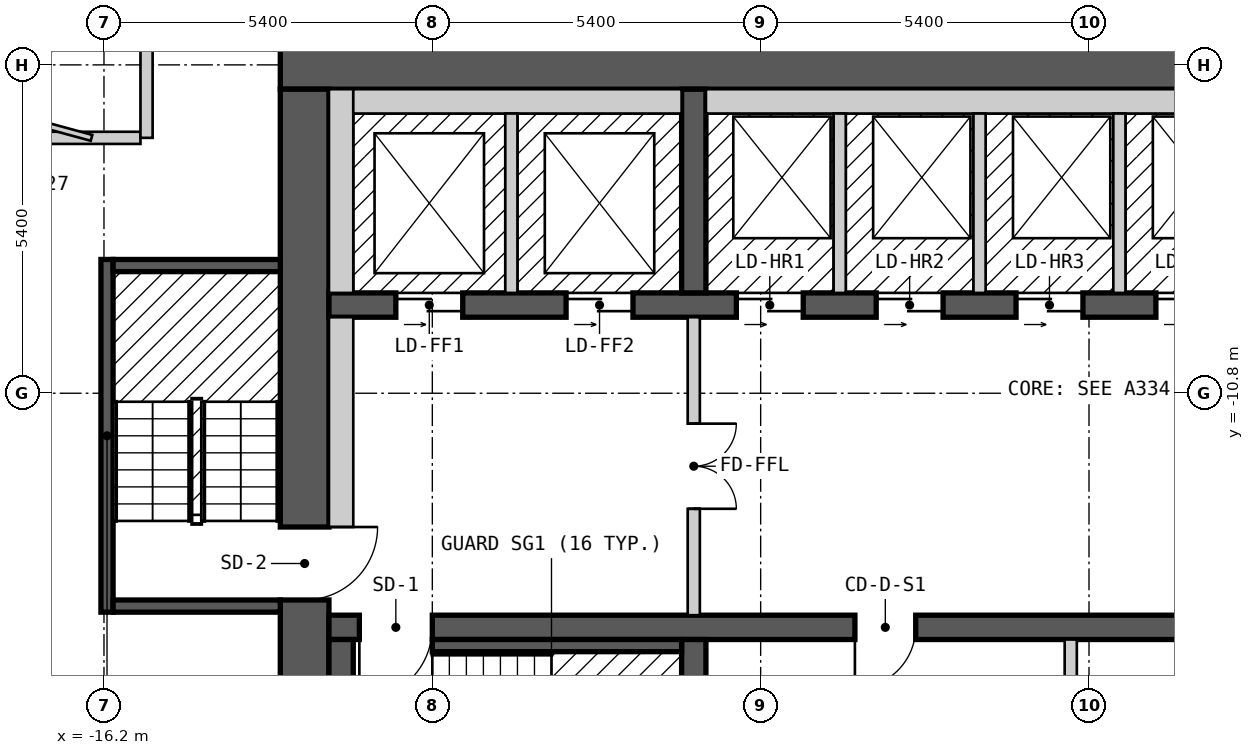
"""IFC4 building model, lengths in metres.
Left out: names, types, materials, properties, quantities, classifications, styles, units other than length and angle.
Written with IfcOpenShell. Run it as: python <this file> out.ifc"""

import sys

from ifc_helpers import new_model, si_unit, direction, frame, frame_2d, origin, place, context, subcontext, project, spatial, polyline, rectangle, outline, extrude, element, fill, save


model = new_model("IFC4")
c1 = context("Model", 3, precision=1e-05, world=origin(), true_north=direction((0.0, 1.0)))
c2 = subcontext(c1, "Body", "Model", "MODEL_VIEW")
j1 = project(units=[si_unit("LENGTHUNIT", "METRE"), si_unit("PLANEANGLEUNIT", "RADIAN")], contexts=[c1])
p1 = place(None, origin())
s1 = spatial("IfcSite", under=j1, at=p1, CompositionType="ELEMENT")
p2 = place(p1, origin())
s2 = spatial("IfcBuilding", under=s1, at=p2, CompositionType="ELEMENT")
p3 = place(p2, frame((0.0, 0.0, 120.6)))
s3 = spatial("IfcBuildingStorey", under=s2, at=p3, CompositionType="ELEMENT", Elevation=120.6)
p4 = place(p3, frame((-13.3, -5.4, 0.0), z_axis=(0.0, 0.0, 1.0), x_axis=(1.0, 0.0, 0.0)))
e1 = element("IfcWall", 1, at=p4, inside=s3, PredefinedType="SHEAR", context=c2, shape_type="SweptSolid", body=[
    extrude(rectangle(XDim=26.6, YDim=0.8, at=frame_2d((13.3, 0.0))), origin(), (0.0, 0.0, 1.0), 2.7),
])
p5 = place(p4, frame((23.65, 0.0, 0.0)))
e2 = element("IfcOpeningElement", 2, at=p5, cuts=e1, PredefinedType="OPENING", context=c2, shape_type="SweptSolid", body=[
    extrude(rectangle(XDim=1.2, YDim=2.1, at=frame_2d((0.6, 1.05))), frame((0.0, 0.41, 0.0), z_axis=(0.0, -1.0, 0.0), x_axis=(1.0, 0.0, 0.0)), (0.0, 0.0, 1.0), 0.82),
])
p6 = place(p3, frame((-12.9, -18.2, 0.0), z_axis=(0.0, 0.0, 1.0), x_axis=(0.0, 1.0, 0.0)))
e3 = element("IfcWall", 3, at=p6, inside=s3, PredefinedType="SHEAR", context=c2, shape_type="SweptSolid", body=[
    extrude(rectangle(XDim=12.4, YDim=0.8, at=frame_2d((6.2, 0.0))), origin(), (0.0, 0.0, 1.0), 2.7),
])
p7 = place(p6, frame((4.0, 0.0, 0.0)))
e4 = element("IfcOpeningElement", 4, at=p7, cuts=e3, PredefinedType="OPENING", context=c2, shape_type="SweptSolid", body=[
    extrude(rectangle(XDim=1.2, YDim=2.1, at=frame_2d((0.6, 1.05))), frame((0.0, 0.41, 0.0), z_axis=(0.0, -1.0, 0.0), x_axis=(1.0, 0.0, 0.0)), (0.0, 0.0, 1.0), 0.82),
])
p8 = place(p3, frame((-12.5, -14.65, 0.0), z_axis=(0.0, 0.0, 1.0), x_axis=(1.0, 0.0, 0.0)))
e5 = element("IfcWall", 5, at=p8, inside=s3, PredefinedType="SHEAR", context=c2, shape_type="SweptSolid", body=[
    extrude(rectangle(XDim=25.0, YDim=0.4, at=frame_2d((12.5, 0.0))), origin(), (0.0, 0.0, 1.0), 2.7),
])
p9 = place(p8, frame((1.7, 0.0, 0.0), z_axis=(0.0, 0.0, 1.0), x_axis=(-1.0, 0.0, 0.0)))
e6 = element("IfcOpeningElement", 6, at=p9, cuts=e5, PredefinedType="OPENING", context=c2, shape_type="SweptSolid", body=[
    extrude(rectangle(XDim=1.2, YDim=2.1, at=frame_2d((0.6, 1.05))), frame((0.0, 0.21, 0.0), z_axis=(0.0, -1.0, 0.0), x_axis=(1.0, 0.0, 0.0)), (0.0, 0.0, 1.0), 0.42),
])
p10 = place(p8, frame((24.55, 0.0, 0.0), z_axis=(0.0, 0.0, 1.0), x_axis=(-1.0, 0.0, 0.0)))
e7 = element("IfcOpeningElement", 7, at=p10, cuts=e5, PredefinedType="OPENING", context=c2, shape_type="SweptSolid", body=[
    extrude(rectangle(XDim=1.2, YDim=2.1, at=frame_2d((0.6, 1.05))), frame((0.0, 0.21, 0.0), z_axis=(0.0, -1.0, 0.0), x_axis=(1.0, 0.0, 0.0)), (0.0, 0.0, 1.0), 0.42),
])
p11 = place(p8, frame((9.65, 0.0, 0.0), z_axis=(0.0, 0.0, 1.0), x_axis=(-1.0, 0.0, 0.0)))
e8 = element("IfcOpeningElement", 8, at=p11, cuts=e5, PredefinedType="OPENING", context=c2, shape_type="SweptSolid", body=[
    extrude(rectangle(XDim=1.0, YDim=2.1, at=frame_2d((0.5, 1.05))), frame((0.0, 0.21, 0.0), z_axis=(0.0, -1.0, 0.0), x_axis=(1.0, 0.0, 0.0)), (0.0, 0.0, 1.0), 0.42),
])
p12 = place(p8, frame((16.05, 0.0, 0.0), z_axis=(0.0, 0.0, 1.0), x_axis=(-1.0, 0.0, 0.0)))
e9 = element("IfcOpeningElement", 9, at=p12, cuts=e5, PredefinedType="OPENING", context=c2, shape_type="SweptSolid", body=[
    extrude(rectangle(XDim=1.0, YDim=2.1, at=frame_2d((0.5, 1.05))), frame((0.0, 0.21, 0.0), z_axis=(0.0, -1.0, 0.0), x_axis=(1.0, 0.0, 0.0)), (0.0, 0.0, 1.0), 0.42),
])
p13 = place(p3, frame((-12.5, -9.35, 0.0), z_axis=(0.0, 0.0, 1.0), x_axis=(1.0, 0.0, 0.0)))
e10 = element("IfcWall", 10, at=p13, inside=s3, PredefinedType="SHEAR", context=c2, shape_type="SweptSolid", body=[
    extrude(rectangle(XDim=22.7, YDim=0.4, at=frame_2d((11.35, 0.0))), origin(), (0.0, 0.0, 1.0), 2.7),
])
p14 = place(p13, frame((1.1, 0.0, 0.0)))
e11 = element("IfcOpeningElement", 11, at=p14, cuts=e10, PredefinedType="OPENING", context=c2, shape_type="SweptSolid", body=[
    extrude(rectangle(XDim=1.1, YDim=2.1, at=frame_2d((0.55, 1.05))), frame((0.0, 0.21, 0.0), z_axis=(0.0, -1.0, 0.0), x_axis=(1.0, 0.0, 0.0)), (0.0, 0.0, 1.0), 0.42),
])
p15 = place(p13, frame((3.9, 0.0, 0.0)))
e12 = element("IfcOpeningElement", 12, at=p15, cuts=e10, PredefinedType="OPENING", context=c2, shape_type="SweptSolid", body=[
    extrude(rectangle(XDim=1.1, YDim=2.1, at=frame_2d((0.55, 1.05))), frame((0.0, 0.21, 0.0), z_axis=(0.0, -1.0, 0.0), x_axis=(1.0, 0.0, 0.0)), (0.0, 0.0, 1.0), 0.42),
])
p16 = place(p13, frame((6.7, 0.0, 0.0)))
e13 = element("IfcOpeningElement", 13, at=p16, cuts=e10, PredefinedType="OPENING", context=c2, shape_type="SweptSolid", body=[
    extrude(rectangle(XDim=1.1, YDim=2.1, at=frame_2d((0.55, 1.05))), frame((0.0, 0.21, 0.0), z_axis=(0.0, -1.0, 0.0), x_axis=(1.0, 0.0, 0.0)), (0.0, 0.0, 1.0), 0.42),
])
p17 = place(p13, frame((9.0, 0.0, 0.0)))
e14 = element("IfcOpeningElement", 14, at=p17, cuts=e10, PredefinedType="OPENING", context=c2, shape_type="SweptSolid", body=[
    extrude(rectangle(XDim=1.1, YDim=2.1, at=frame_2d((0.55, 1.05))), frame((0.0, 0.21, 0.0), z_axis=(0.0, -1.0, 0.0), x_axis=(1.0, 0.0, 0.0)), (0.0, 0.0, 1.0), 0.42),
])
p18 = place(p13, frame((11.3, 0.0, 0.0)))
e15 = element("IfcOpeningElement", 15, at=p18, cuts=e10, PredefinedType="OPENING", context=c2, shape_type="SweptSolid", body=[
    extrude(rectangle(XDim=1.1, YDim=2.1, at=frame_2d((0.55, 1.05))), frame((0.0, 0.21, 0.0), z_axis=(0.0, -1.0, 0.0), x_axis=(1.0, 0.0, 0.0)), (0.0, 0.0, 1.0), 0.42),
])
p19 = place(p13, frame((13.6, 0.0, 0.0)))
e16 = element("IfcOpeningElement", 16, at=p19, cuts=e10, PredefinedType="OPENING", context=c2, shape_type="SweptSolid", body=[
    extrude(rectangle(XDim=1.1, YDim=2.1, at=frame_2d((0.55, 1.05))), frame((0.0, 0.21, 0.0), z_axis=(0.0, -1.0, 0.0), x_axis=(1.0, 0.0, 0.0)), (0.0, 0.0, 1.0), 0.42),
])
p20 = place(p13, frame((15.9, 0.0, 0.0)))
e17 = element("IfcOpeningElement", 17, at=p20, cuts=e10, PredefinedType="OPENING", context=c2, shape_type="SweptSolid", body=[
    extrude(rectangle(XDim=1.1, YDim=2.1, at=frame_2d((0.55, 1.05))), frame((0.0, 0.21, 0.0), z_axis=(0.0, -1.0, 0.0), x_axis=(1.0, 0.0, 0.0)), (0.0, 0.0, 1.0), 0.42),
])
p21 = place(p13, frame((18.2, 0.0, 0.0)))
e18 = element("IfcOpeningElement", 18, at=p21, cuts=e10, PredefinedType="OPENING", context=c2, shape_type="SweptSolid", body=[
    extrude(rectangle(XDim=1.1, YDim=2.1, at=frame_2d((0.55, 1.05))), frame((0.0, 0.21, 0.0), z_axis=(0.0, -1.0, 0.0), x_axis=(1.0, 0.0, 0.0)), (0.0, 0.0, 1.0), 0.42),
])
p22 = place(p13, frame((20.6, 0.0, 0.0)))
e19 = element("IfcOpeningElement", 19, at=p22, cuts=e10, PredefinedType="OPENING", context=c2, shape_type="SweptSolid", body=[
    extrude(rectangle(XDim=1.1, YDim=2.1, at=frame_2d((0.55, 1.05))), frame((0.0, 0.21, 0.0), z_axis=(0.0, -1.0, 0.0), x_axis=(1.0, 0.0, 0.0)), (0.0, 0.0, 1.0), 0.42),
])
for number, where, z_axis, x_axis in (
    (20, (-6.5, -18.2, 0.0), (0.0, 0.0, 1.0), (0.0, 1.0, 0.0)),
    (21, (-6.5, -9.15, 0.0), (0.0, 0.0, 1.0), (0.0, 1.0, 0.0)),
):
    element("IfcWall", number, at=place(p3, frame(where, z_axis=z_axis, x_axis=x_axis)), inside=s3, PredefinedType="SHEAR", context=c2, shape_type="SweptSolid", body=[
        extrude(rectangle(XDim=3.35, YDim=0.4, at=frame_2d((1.675, 0.0))), origin(), (0.0, 0.0, 1.0), 2.7),
    ])
p23 = place(p3, frame((-28.218, -2.025, 0.0), z_axis=(0.0, 0.0, 1.0), x_axis=(0.500017503135, -0.866015298109, 0.0)))
e22 = element("IfcWall", 22, at=p23, inside=s3, PredefinedType="SOLIDWALL", context=c2, shape_type="SweptSolid", body=[
    extrude(outline(polyline([(0.0, -0.15), (24.711, -0.15), (24.631, 0.15), (0.08, 0.15), (0.0, -0.15)])), origin(), (0.0, 0.0, 1.0), 2.7),
])
p24 = place(p23, frame((1.4, 0.0, 0.15)))
e23 = element("IfcOpeningElement", 23, at=p24, cuts=e22, PredefinedType="OPENING", context=c2, shape_type="SweptSolid", body=[
    extrude(rectangle(XDim=1.5, YDim=2.1, at=frame_2d((0.75, 1.05))), frame((0.0, 0.16, 0.0), z_axis=(0.0, -1.0, 0.0), x_axis=(1.0, 0.0, 0.0)), (0.0, 0.0, 1.0), 0.32),
])
p25 = place(p23, frame((4.316, 0.0, 0.15)))
e24 = element("IfcOpeningElement", 24, at=p25, cuts=e22, PredefinedType="OPENING", context=c2, shape_type="SweptSolid", body=[
    extrude(rectangle(XDim=1.5, YDim=2.1, at=frame_2d((0.75, 1.05))), frame((0.0, 0.16, 0.0), z_axis=(0.0, -1.0, 0.0), x_axis=(1.0, 0.0, 0.0)), (0.0, 0.0, 1.0), 0.32),
])
p26 = place(p23, frame((7.231, 0.0, 0.15)))
e25 = element("IfcOpeningElement", 25, at=p26, cuts=e22, PredefinedType="OPENING", context=c2, shape_type="SweptSolid", body=[
    extrude(rectangle(XDim=1.5, YDim=2.1, at=frame_2d((0.75, 1.05))), frame((0.0, 0.16, 0.0), z_axis=(0.0, -1.0, 0.0), x_axis=(1.0, 0.0, 0.0)), (0.0, 0.0, 1.0), 0.32),
])
p27 = place(p23, frame((10.147, 0.0, 0.15)))
e26 = element("IfcOpeningElement", 26, at=p27, cuts=e22, PredefinedType="OPENING", context=c2, shape_type="SweptSolid", body=[
    extrude(rectangle(XDim=1.5, YDim=2.1, at=frame_2d((0.75, 1.05))), frame((0.0, 0.16, 0.0), z_axis=(0.0, -1.0, 0.0), x_axis=(1.0, 0.0, 0.0)), (0.0, 0.0, 1.0), 0.32),
])
p28 = place(p23, frame((13.062, 0.0, 0.15)))
e27 = element("IfcOpeningElement", 27, at=p28, cuts=e22, PredefinedType="OPENING", context=c2, shape_type="SweptSolid", body=[
    extrude(rectangle(XDim=1.5, YDim=2.1, at=frame_2d((0.75, 1.05))), frame((0.0, 0.16, 0.0), z_axis=(0.0, -1.0, 0.0), x_axis=(1.0, 0.0, 0.0)), (0.0, 0.0, 1.0), 0.32),
])
p29 = place(p23, frame((15.977, 0.0, 0.15)))
e28 = element("IfcOpeningElement", 28, at=p29, cuts=e22, PredefinedType="OPENING", context=c2, shape_type="SweptSolid", body=[
    extrude(rectangle(XDim=1.5, YDim=2.1, at=frame_2d((0.75, 1.05))), frame((0.0, 0.16, 0.0), z_axis=(0.0, -1.0, 0.0), x_axis=(1.0, 0.0, 0.0)), (0.0, 0.0, 1.0), 0.32),
])
p30 = place(p23, frame((18.893, 0.0, 0.15)))
e29 = element("IfcOpeningElement", 29, at=p30, cuts=e22, PredefinedType="OPENING", context=c2, shape_type="SweptSolid", body=[
    extrude(rectangle(XDim=1.5, YDim=2.1, at=frame_2d((0.75, 1.05))), frame((0.0, 0.16, 0.0), z_axis=(0.0, -1.0, 0.0), x_axis=(1.0, 0.0, 0.0)), (0.0, 0.0, 1.0), 0.32),
])
p31 = place(p23, frame((21.809, 0.0, 0.15)))
e30 = element("IfcOpeningElement", 30, at=p31, cuts=e22, PredefinedType="OPENING", context=c2, shape_type="SweptSolid", body=[
    extrude(rectangle(XDim=1.5, YDim=2.1, at=frame_2d((0.75, 1.05))), frame((0.0, 0.16, 0.0), z_axis=(0.0, -1.0, 0.0), x_axis=(1.0, 0.0, 0.0)), (0.0, 0.0, 1.0), 0.32),
])
p32 = place(p3, frame((-18.15, -6.6, 0.0), z_axis=(0.0, 0.0, 1.0), x_axis=(1.0, 0.0, 0.0)))
e31 = element("IfcWall", 31, at=p32, inside=s3, PredefinedType="PARTITIONING", context=c2, shape_type="SweptSolid", body=[
    extrude(rectangle(XDim=2.55, YDim=0.2, at=frame_2d((1.275, 0.0))), origin(), (0.0, 0.0, 1.0), 2.7),
])
p33 = place(p3, frame((-15.5, -6.6, 0.0), z_axis=(0.0, 0.0, 1.0), x_axis=(0.0, 1.0, 0.0)))
e32 = element("IfcWall", 32, at=p33, inside=s3, PredefinedType="PARTITIONING", context=c2, shape_type="SweptSolid", body=[
    extrude(rectangle(XDim=2.044, YDim=0.2, at=frame_2d((1.022, 0.0))), origin(), (0.0, 0.0, 1.0), 2.7),
])
p34 = place(p3, frame((-19.631, -5.721, 0.0), z_axis=(0.0, 0.0, 1.0), x_axis=(0.964816035809, -0.262925877475, 0.0)))
e33 = element("IfcWall", 33, at=p34, inside=s3, PredefinedType="PARTITIONING", context=c2, shape_type="SweptSolid", body=[
    extrude(rectangle(XDim=3.344, YDim=0.1, at=frame_2d((1.672, 0.0))), origin(), (0.0, 0.0, 1.0), 2.7),
])
p35 = place(p34, frame((1.047, 0.0, 0.0)))
e34 = element("IfcOpeningElement", 34, at=p35, cuts=e33, PredefinedType="OPENING", context=c2, shape_type="SweptSolid", body=[
    extrude(rectangle(XDim=0.8, YDim=2.1, at=frame_2d((0.4, 1.05))), frame((0.0, 0.06, 0.0), z_axis=(0.0, -1.0, 0.0), x_axis=(1.0, 0.0, 0.0)), (0.0, 0.0, 1.0), 0.12),
])
p36 = place(p3, frame((-24.826, -7.599, 0.0), z_axis=(0.0, 0.0, 1.0), x_axis=(0.86599621094, 0.500050560081, 0.0)))
e35 = element("IfcWall", 35, at=p36, inside=s3, PredefinedType="PARTITIONING", context=c2, shape_type="SweptSolid", body=[
    extrude(rectangle(XDim=10.069, YDim=0.2, at=frame_2d((5.035, 0.0))), origin(), (0.0, 0.0, 1.0), 2.7),
])
p37 = place(p3, frame((-16.15, -14.4, 0.0), z_axis=(0.0, 0.0, 1.0), x_axis=(0.0, 1.0, 0.0)))
e36 = element("IfcWall", 36, at=p37, inside=s3, PredefinedType="SOLIDWALL", context=c2, shape_type="SweptSolid", body=[
    extrude(rectangle(XDim=5.8, YDim=0.2, at=frame_2d((2.9, 0.0))), origin(), (0.0, 0.0, 1.0), 2.7),
])
for number, where, z_axis, x_axis in (
    (37, (-16.05, -14.3, 0.0), (0.0, 0.0, 1.0), (1.0, 0.0, 0.0)),
    (38, (-16.05, -8.7, 0.0), (0.0, 0.0, 1.0), (1.0, 0.0, 0.0)),
):
    element("IfcWall", number, at=place(p3, frame(where, z_axis=z_axis, x_axis=x_axis)), inside=s3, PredefinedType="SOLIDWALL", context=c2, shape_type="SweptSolid", body=[
        extrude(rectangle(XDim=2.75, YDim=0.2, at=frame_2d((1.375, 0.0))), origin(), (0.0, 0.0, 1.0), 2.7),
    ])
p38 = place(p3, frame((-12.3, -18.2, 0.0), z_axis=(0.0, 0.0, 1.0), x_axis=(0.0, 1.0, 0.0)))
e39 = element("IfcWall", 39, at=p38, inside=s3, PredefinedType="SOLIDWALL", context=c2, shape_type="SweptSolid", body=[
    extrude(rectangle(XDim=3.35, YDim=0.4, at=frame_2d((1.675, 0.0))), origin(), (0.0, 0.0, 1.0), 2.7),
])
p39 = place(p3, frame((-12.3, -13.0, 0.0), z_axis=(0.0, 0.0, 1.0), x_axis=(0.0, 1.0, 0.0)))
e40 = element("IfcWall", 40, at=p39, inside=s3, PredefinedType="PARTITIONING", context=c2, shape_type="SweptSolid", body=[
    extrude(rectangle(XDim=3.45, YDim=0.4, at=frame_2d((1.725, 0.0))), origin(), (0.0, 0.0, 1.0), 2.7),
])
p40 = place(p3, frame((-12.3, -9.15, 0.0), z_axis=(0.0, 0.0, 1.0), x_axis=(0.0, 1.0, 0.0)))
e41 = element("IfcWall", 41, at=p40, inside=s3, PredefinedType="SOLIDWALL", context=c2, shape_type="SweptSolid", body=[
    extrude(rectangle(XDim=3.35, YDim=0.4, at=frame_2d((1.675, 0.0))), origin(), (0.0, 0.0, 1.0), 2.7),
])
p41 = place(p3, frame((-12.1, -6.0, 0.0), z_axis=(0.0, 0.0, 1.0), x_axis=(1.0, 0.0, 0.0)))
e42 = element("IfcWall", 42, at=p41, inside=s3, PredefinedType="SOLIDWALL", context=c2, shape_type="SweptSolid", body=[
    extrude(rectangle(XDim=5.4, YDim=0.4, at=frame_2d((2.7, 0.0))), origin(), (0.0, 0.0, 1.0), 2.7),
])
p42 = place(p3, frame((-10.8, -14.95, 0.0), z_axis=(0.0, 0.0, 1.0), x_axis=(1.0, 0.0, 0.0)))
e43 = element("IfcWall", 43, at=p42, inside=s3, PredefinedType="SOLIDWALL", context=c2, shape_type="SweptSolid", body=[
    extrude(rectangle(XDim=4.1, YDim=0.2, at=frame_2d((2.05, 0.0))), origin(), (0.0, 0.0, 1.0), 2.7),
])
p43 = place(p3, frame((-9.5, -9.15, 0.0), z_axis=(0.0, 0.0, 1.0), x_axis=(0.0, 1.0, 0.0)))
e44 = element("IfcWall", 44, at=p43, inside=s3, PredefinedType="SOLIDWALL", context=c2, shape_type="SweptSolid", body=[
    extrude(rectangle(XDim=2.95, YDim=0.2, at=frame_2d((1.475, 0.0))), origin(), (0.0, 0.0, 1.0), 2.7),
])
p44 = place(p3, frame((-6.5, -14.45, 0.0), z_axis=(0.0, 0.0, 1.0), x_axis=(0.0, 1.0, 0.0)))
e45 = element("IfcWall", 45, at=p44, inside=s3, PredefinedType="PARTITIONING", context=c2, shape_type="SweptSolid", body=[
    extrude(rectangle(XDim=4.9, YDim=0.2, at=frame_2d((2.45, 0.0))), origin(), (0.0, 0.0, 1.0), 2.7),
])
p45 = place(p44, frame((3.15, 0.0, 0.0), z_axis=(0.0, 0.0, 1.0), x_axis=(-1.0, 0.0, 0.0)))
e46 = element("IfcOpeningElement", 46, at=p45, cuts=e45, PredefinedType="OPENING", context=c2, shape_type="SweptSolid", body=[
    extrude(rectangle(XDim=1.4, YDim=2.1, at=frame_2d((0.7, 1.05))), frame((0.0, 0.11, 0.0), z_axis=(0.0, -1.0, 0.0), x_axis=(1.0, 0.0, 0.0)), (0.0, 0.0, 1.0), 0.22),
])
p46 = place(p3, frame((-6.3, -6.0, 0.0), z_axis=(0.0, 0.0, 1.0), x_axis=(1.0, 0.0, 0.0)))
e47 = element("IfcWall", 47, at=p46, inside=s3, PredefinedType="SOLIDWALL", context=c2, shape_type="SweptSolid", body=[
    extrude(rectangle(XDim=16.1, YDim=0.4, at=frame_2d((8.05, 0.0))), origin(), (0.0, 0.0, 1.0), 2.7),
])
for number, where, z_axis, x_axis in (
    (48, (-4.1, -9.15, 0.0), (0.0, 0.0, 1.0), (0.0, 1.0, 0.0)),
    (49, (-1.8, -9.15, 0.0), (0.0, 0.0, 1.0), (0.0, 1.0, 0.0)),
):
    element("IfcWall", number, at=place(p3, frame(where, z_axis=z_axis, x_axis=x_axis)), inside=s3, PredefinedType="SOLIDWALL", context=c2, shape_type="SweptSolid", body=[
        extrude(rectangle(XDim=2.95, YDim=0.2, at=frame_2d((1.475, 0.0))), origin(), (0.0, 0.0, 1.0), 2.7),
    ])
p47 = place(p3, frame((-0.3, -17.8, 0.0), z_axis=(0.0, 0.0, 1.0), x_axis=(0.0, 1.0, 0.0)))
e50 = element("IfcWall", 50, at=p47, inside=s3, PredefinedType="PARTITIONING", context=c2, shape_type="SweptSolid", body=[
    extrude(rectangle(XDim=2.95, YDim=0.2, at=frame_2d((1.475, 0.0))), origin(), (0.0, 0.0, 1.0), 2.7),
])
p48 = place(p3, frame((0.5, -9.15, 0.0), z_axis=(0.0, 0.0, 1.0), x_axis=(0.0, 1.0, 0.0)))
e51 = element("IfcWall", 51, at=p48, inside=s3, PredefinedType="SOLIDWALL", context=c2, shape_type="SweptSolid", body=[
    extrude(rectangle(XDim=2.95, YDim=0.2, at=frame_2d((1.475, 0.0))), origin(), (0.0, 0.0, 1.0), 2.7),
])
p49 = place(p14, origin())
e52 = element("IfcDoor", 52, at=p49, inside=s3, OperationType="DOUBLE_DOOR_SLIDING", PredefinedType="DOOR", context=c2, shape_type="SweptSolid", body=[
    extrude(rectangle(XDim=1.1, YDim=2.1, at=frame_2d((0.55, 1.05))), frame((0.0, 0.025, 0.0), z_axis=(0.0, -1.0, 0.0), x_axis=(1.0, 0.0, 0.0)), (0.0, 0.0, 1.0), 0.05),
])
fill(e11, e52)
p50 = place(p15, origin())
e53 = element("IfcDoor", 53, at=p50, inside=s3, OperationType="DOUBLE_DOOR_SLIDING", PredefinedType="DOOR", context=c2, shape_type="SweptSolid", body=[
    extrude(rectangle(XDim=1.1, YDim=2.1, at=frame_2d((0.55, 1.05))), frame((0.0, 0.025, 0.0), z_axis=(0.0, -1.0, 0.0), x_axis=(1.0, 0.0, 0.0)), (0.0, 0.0, 1.0), 0.05),
])
fill(e12, e53)
p51 = place(p16, origin())
e54 = element("IfcDoor", 54, at=p51, inside=s3, OperationType="DOUBLE_DOOR_SLIDING", PredefinedType="DOOR", context=c2, shape_type="SweptSolid", body=[
    extrude(rectangle(XDim=1.1, YDim=2.1, at=frame_2d((0.55, 1.05))), frame((0.0, 0.025, 0.0), z_axis=(0.0, -1.0, 0.0), x_axis=(1.0, 0.0, 0.0)), (0.0, 0.0, 1.0), 0.05),
])
fill(e13, e54)
p52 = place(p17, origin())
e55 = element("IfcDoor", 55, at=p52, inside=s3, OperationType="DOUBLE_DOOR_SLIDING", PredefinedType="DOOR", context=c2, shape_type="SweptSolid", body=[
    extrude(rectangle(XDim=1.1, YDim=2.1, at=frame_2d((0.55, 1.05))), frame((0.0, 0.025, 0.0), z_axis=(0.0, -1.0, 0.0), x_axis=(1.0, 0.0, 0.0)), (0.0, 0.0, 1.0), 0.05),
])
fill(e14, e55)
p53 = place(p18, origin())
e56 = element("IfcDoor", 56, at=p53, inside=s3, OperationType="DOUBLE_DOOR_SLIDING", PredefinedType="DOOR", context=c2, shape_type="SweptSolid", body=[
    extrude(rectangle(XDim=1.1, YDim=2.1, at=frame_2d((0.55, 1.05))), frame((0.0, 0.025, 0.0), z_axis=(0.0, -1.0, 0.0), x_axis=(1.0, 0.0, 0.0)), (0.0, 0.0, 1.0), 0.05),
])
fill(e15, e56)
p54 = place(p19, origin())
e57 = element("IfcDoor", 57, at=p54, inside=s3, OperationType="DOUBLE_DOOR_SLIDING", PredefinedType="DOOR", context=c2, shape_type="SweptSolid", body=[
    extrude(rectangle(XDim=1.1, YDim=2.1, at=frame_2d((0.55, 1.05))), frame((0.0, 0.025, 0.0), z_axis=(0.0, -1.0, 0.0), x_axis=(1.0, 0.0, 0.0)), (0.0, 0.0, 1.0), 0.05),
])
fill(e16, e57)
p55 = place(p9, origin())
e58 = element("IfcDoor", 58, at=p55, inside=s3, OperationType="SINGLE_SWING_RIGHT", PredefinedType="DOOR", context=c2, shape_type="SweptSolid", body=[
    extrude(rectangle(XDim=1.2, YDim=2.1, at=frame_2d((0.6, 1.05))), frame((0.0, 0.025, 0.0), z_axis=(0.0, -1.0, 0.0), x_axis=(1.0, 0.0, 0.0)), (0.0, 0.0, 1.0), 0.05),
])
fill(e6, e58)
p56 = place(p7, origin())
e59 = element("IfcDoor", 59, at=p56, inside=s3, OperationType="SINGLE_SWING_RIGHT", PredefinedType="DOOR", context=c2, shape_type="SweptSolid", body=[
    extrude(rectangle(XDim=1.2, YDim=2.1, at=frame_2d((0.6, 1.05))), frame((0.0, 0.025, 0.0), z_axis=(0.0, -1.0, 0.0), x_axis=(1.0, 0.0, 0.0)), (0.0, 0.0, 1.0), 0.05),
])
fill(e4, e59)
p57 = place(p45, origin())
e60 = element("IfcDoor", 60, at=p57, inside=s3, OperationType="DOUBLE_DOOR_SINGLE_SWING", PredefinedType="DOOR", context=c2, shape_type="SweptSolid", body=[
    extrude(rectangle(XDim=1.4, YDim=2.1, at=frame_2d((0.7, 1.05))), frame((0.0, 0.025, 0.0), z_axis=(0.0, -1.0, 0.0), x_axis=(1.0, 0.0, 0.0)), (0.0, 0.0, 1.0), 0.05),
])
fill(e46, e60)
p58 = place(p11, origin())
e61 = element("IfcDoor", 61, at=p58, inside=s3, OperationType="SINGLE_SWING_RIGHT", PredefinedType="DOOR", context=c2, shape_type="SweptSolid", body=[
    extrude(rectangle(XDim=1.0, YDim=2.1, at=frame_2d((0.5, 1.05))), frame((0.0, 0.025, 0.0), z_axis=(0.0, -1.0, 0.0), x_axis=(1.0, 0.0, 0.0)), (0.0, 0.0, 1.0), 0.05),
])
fill(e8, e61)
save(model, sys.argv[1])
